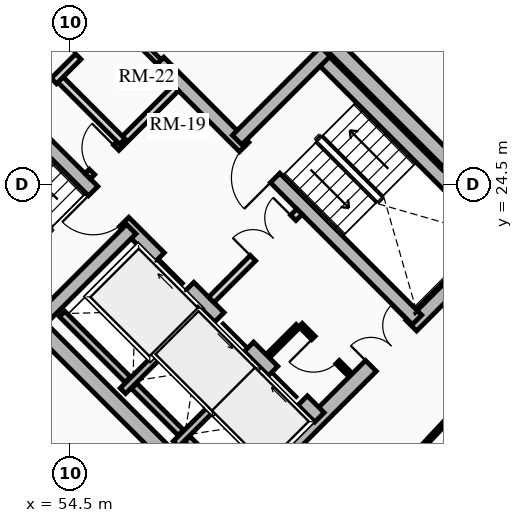
"""IFC4 building model, lengths in metres.
Left out: names, types, materials, properties, quantities, classifications, styles, units other than length and angle.
Written with IfcOpenShell. Run it as: python <this file> out.ifc"""

import sys

from ifc_helpers import new_model, si_unit, direction, frame, frame_2d, origin, place, context, subcontext, project, spatial, rectangle, extrude, source, transform, mapped, element, fill, save


model = new_model("IFC4")
c1 = context("Model", 3, precision=1e-05, world=origin(), true_north=direction((0.0, 1.0)))
c2 = subcontext(c1, "Body", "Model", "MODEL_VIEW")
j1 = project(units=[si_unit("LENGTHUNIT", "METRE"), si_unit("PLANEANGLEUNIT", "RADIAN")], contexts=[c1])
p1 = place(None, origin())
s1 = spatial("IfcSite", under=j1, at=p1, CompositionType="ELEMENT")
p2 = place(p1, origin())
s2 = spatial("IfcBuilding", under=s1, at=p2, CompositionType="ELEMENT")
p3 = place(p2, frame((0.0, 0.0, 232.45)))
s3 = spatial("IfcBuildingStorey", under=s2, at=p3, CompositionType="ELEMENT", Elevation=232.45)
for number, where, z_axis, x_axis in (
    (1, (58.702, 15.732, 0.0), (0.0, 0.0, 1.0), (-0.707, 0.707, 0.0)),
    (2, (66.268, 23.298, 0.0), (0.0, 0.0, 1.0), (-0.707, 0.707, 0.0)),
):
    element("IfcWall", number, at=place(p3, frame(where, z_axis=z_axis, x_axis=x_axis)), inside=s3, PredefinedType="SHEAR", context=c2, shape_type="SweptSolid", body=[
        extrude(rectangle(XDim=14.1, YDim=0.4, at=frame_2d((7.05, 0.0))), origin(), (0.0, 0.0, 1.0), 3.2),
    ])
p4 = place(p3, frame((58.561, 15.873, 0.0), z_axis=(0.0, 0.0, 1.0), x_axis=(0.707106781187, 0.707106781187, 0.0)))
e3 = element("IfcWall", 3, at=p4, inside=s3, PredefinedType="SHEAR", context=c2, shape_type="SweptSolid", body=[
    extrude(rectangle(XDim=10.7, YDim=0.4, at=frame_2d((5.35, 0.0))), origin(), (0.0, 0.0, 1.0), 3.2),
])
m1 = source(origin(), c2, "Body", "SweptSolid", [
    extrude(rectangle(XDim=1.5, YDim=2.02, at=frame_2d((0.75, 1.01))), frame((0.0, 0.21, 0.0), z_axis=(0.0, -1.0, 0.0), x_axis=(1.0, 0.0, 0.0)), (0.0, 0.0, 1.0), 0.42),
])
p5 = place(p4, frame((5.45, 0.0, 0.0)))
e4 = element("IfcOpeningElement", 4, at=p5, cuts=e3, PredefinedType="OPENING", context=c2, shape_type="MappedRepresentation", body=[
    mapped(m1, transform((0.0, 0.0, 0.0), x_axis=(1.0, 0.0, 0.0), y_axis=(0.0, 1.0, 0.0), z_axis=(0.0, 0.0, 1.0), scale=1.0)),
])
p6 = place(p3, frame((48.873, 25.561, 0.0), z_axis=(0.0, 0.0, 1.0), x_axis=(0.707106781187, 0.707106781187, 0.0)))
e5 = element("IfcWall", 5, at=p6, inside=s3, PredefinedType="SHEAR", context=c2, shape_type="SweptSolid", body=[
    extrude(rectangle(XDim=10.7, YDim=0.4, at=frame_2d((5.35, 0.0))), origin(), (0.0, 0.0, 1.0), 3.2),
])
p7 = place(p6, frame((4.6, 0.0, 0.0)))
e6 = element("IfcOpeningElement", 6, at=p7, cuts=e5, PredefinedType="OPENING", context=c2, shape_type="MappedRepresentation", body=[
    mapped(m1, transform((0.0, 0.0, 0.0), x_axis=(1.0, 0.0, 0.0), y_axis=(0.0, 1.0, 0.0), z_axis=(0.0, 0.0, 1.0), scale=1.0)),
])
p8 = place(p3, frame((61.06, 18.373, 0.0), z_axis=(0.0, 0.0, 1.0), x_axis=(-0.707106781187, 0.707106781187, 0.0)))
e7 = element("IfcWall", 7, at=p8, inside=s3, PredefinedType="SHEAR", context=c2, shape_type="SweptSolid", body=[
    extrude(rectangle(XDim=13.7, YDim=0.35, at=frame_2d((6.85, 0.0))), origin(), (0.0, 0.0, 1.0), 3.2),
])
m2 = source(origin(), c2, "Body", "SweptSolid", [
    extrude(rectangle(XDim=1.1, YDim=2.015, at=frame_2d((0.55, 1.007))), frame((0.0, 0.185, 0.0), z_axis=(0.0, -1.0, 0.0), x_axis=(1.0, 0.0, 0.0)), (0.0, 0.0, 1.0), 0.37),
])
p9 = place(p8, frame((4.85, 0.0, 0.0)))
e8 = element("IfcOpeningElement", 8, at=p9, cuts=e7, PredefinedType="OPENING", context=c2, shape_type="MappedRepresentation", body=[
    mapped(m2, transform((0.0, 0.0, 0.0), x_axis=(1.0, 0.0, 0.0), y_axis=(0.0, 1.0, 0.0), z_axis=(0.0, 0.0, 1.0), scale=1.0)),
])
p10 = place(p8, frame((0.625, 0.0, 0.0)))
e9 = element("IfcOpeningElement", 9, at=p10, cuts=e7, PredefinedType="OPENING", context=c2, shape_type="MappedRepresentation", body=[
    mapped(m2, transform((0.0, 0.0, 0.0), x_axis=(1.0, 0.0, 0.0), y_axis=(0.0, 1.0, 0.0), z_axis=(0.0, 0.0, 1.0), scale=1.0)),
])
p11 = place(p8, frame((2.625, 0.0, 0.0)))
e10 = element("IfcOpeningElement", 10, at=p11, cuts=e7, PredefinedType="OPENING", context=c2, shape_type="MappedRepresentation", body=[
    mapped(m2, transform((0.0, 0.0, 0.0), x_axis=(1.0, 0.0, 0.0), y_axis=(0.0, 1.0, 0.0), z_axis=(0.0, 0.0, 1.0), scale=1.0)),
])
m3 = source(origin(), c2, "Body", "SweptSolid", [
    extrude(rectangle(XDim=1.15, YDim=2.02, at=frame_2d((0.575, 1.01))), frame((0.0, 0.185, 0.0), z_axis=(0.0, -1.0, 0.0), x_axis=(1.0, 0.0, 0.0)), (0.0, 0.0, 1.0), 0.37),
])
p12 = place(p8, frame((7.27, 0.0, 0.0)))
e11 = element("IfcOpeningElement", 11, at=p12, cuts=e7, PredefinedType="OPENING", context=c2, shape_type="MappedRepresentation", body=[
    mapped(m3, transform((0.0, 0.0, 0.0), x_axis=(1.0, 0.0, 0.0), y_axis=(0.0, 1.0, 0.0), z_axis=(0.0, 0.0, 1.0), scale=1.0)),
])
p13 = place(p3, frame((63.627, 20.94, 0.0), z_axis=(0.0, 0.0, 1.0), x_axis=(-0.707119496762, 0.707094065383, 0.0)))
e12 = element("IfcWall", 12, at=p13, inside=s3, PredefinedType="SHEAR", context=c2, shape_type="SweptSolid", body=[
    extrude(rectangle(XDim=9.6, YDim=0.35, at=frame_2d((4.8, 0.0))), origin(), (0.0, 0.0, 1.0), 3.2),
])
p14 = place(p13, frame((5.28, 0.0, 0.0)))
e13 = element("IfcOpeningElement", 13, at=p14, cuts=e12, PredefinedType="OPENING", context=c2, shape_type="MappedRepresentation", body=[
    mapped(m3, transform((0.0, 0.0, 0.0), x_axis=(1.0, 0.0, 0.0), y_axis=(0.0, 1.0, 0.0), z_axis=(0.0, 0.0, 1.0), scale=1.0)),
])
p15 = place(p3, frame((53.922, 21.141, 0.0), z_axis=(0.0, 0.0, 1.0), x_axis=(-0.707106781187, 0.707106781187, 0.0)))
e14 = element("IfcWall", 14, at=p15, inside=s3, PredefinedType="SHEAR", context=c2, shape_type="SweptSolid", body=[
    extrude(rectangle(XDim=6.695, YDim=0.35, at=frame_2d((3.348, 0.0))), origin(), (0.0, 0.0, 1.0), 3.2),
])
p16 = place(p3, frame((53.784, 21.003, 0.0), z_axis=(0.0, 0.0, 1.0), x_axis=(0.707106781187, 0.707106781187, 0.0)))
e15 = element("IfcWall", 15, at=p16, inside=s3, PredefinedType="SHEAR", context=c2, shape_type="SweptSolid", body=[
    extrude(rectangle(XDim=3.285, YDim=0.35, at=frame_2d((1.643, 0.0))), origin(), (0.0, 0.0, 1.0), 3.2),
])
p17 = place(p3, frame((65.812, 23.125, 0.0), z_axis=(0.0, 0.0, 1.0), x_axis=(-0.707106781187, 0.707106781187, 0.0)))
e16 = element("IfcWall", 16, at=p17, inside=s3, PredefinedType="SHEAR", context=c2, shape_type="SweptSolid", body=[
    extrude(rectangle(XDim=6.695, YDim=0.35, at=frame_2d((3.348, 0.0))), origin(), (0.0, 0.0, 1.0), 3.2),
])
p18 = place(p3, frame((58.893, 25.674, 0.0), z_axis=(0.0, 0.0, 1.0), x_axis=(0.707106781187, 0.707106781187, 0.0)))
e17 = element("IfcWall", 17, at=p18, inside=s3, PredefinedType="SHEAR", context=c2, shape_type="SweptSolid", body=[
    extrude(rectangle(XDim=3.285, YDim=0.35, at=frame_2d((1.643, 0.0))), origin(), (0.0, 0.0, 1.0), 3.2),
])
p19 = place(p3, frame((55.888, 19.069, 0.0), z_axis=(0.0, 0.0, 1.0), x_axis=(0.707106781187, 0.707106781187, 0.0)))
e18 = element("IfcWall", 18, at=p19, inside=s3, PredefinedType="SHEAR", context=c2, shape_type="SweptSolid", body=[
    extrude(rectangle(XDim=2.97, YDim=0.2, at=frame_2d((1.485, 0.0))), origin(), (0.0, 0.0, 1.0), 3.2),
])
p20 = place(p3, frame((56.015, 19.366, 0.0), z_axis=(0.0, 0.0, 1.0), x_axis=(-0.707106781187, 0.707106781187, 0.0)))
e19 = element("IfcWall", 19, at=p20, inside=s3, PredefinedType="SHEAR", context=c2, shape_type="SweptSolid", body=[
    extrude(rectangle(XDim=2.44, YDim=0.2, at=frame_2d((1.22, 0.0))), origin(), (0.0, 0.0, 1.0), 3.2),
])
p21 = place(p3, frame((57.284, 17.673, 0.0), z_axis=(0.0, 0.0, 1.0), x_axis=(0.707147878904, 0.70706568108, 0.0)))
e20 = element("IfcWall", 20, at=p21, inside=s3, PredefinedType="SHEAR", context=c2, shape_type="SweptSolid", body=[
    extrude(rectangle(XDim=2.97, YDim=0.2, at=frame_2d((1.485, 0.0))), origin(), (0.0, 0.0, 1.0), 3.2),
])
p22 = place(p3, frame((57.412, 17.97, 0.0), z_axis=(0.0, 0.0, 1.0), x_axis=(-0.707106781187, 0.707106781187, 0.0)))
e21 = element("IfcWall", 21, at=p22, inside=s3, PredefinedType="SHEAR", context=c2, shape_type="SweptSolid", body=[
    extrude(rectangle(XDim=1.735, YDim=0.2, at=frame_2d((0.867, 0.0))), origin(), (0.0, 0.0, 1.0), 3.2),
])
p23 = place(p3, frame((58.737, 16.644, 0.0), z_axis=(0.0, 0.0, 1.0), x_axis=(-0.707032117043, 0.707181437447, 0.0)))
e22 = element("IfcWall", 22, at=p23, inside=s3, PredefinedType="SHEAR", context=c2, shape_type="SweptSolid", body=[
    extrude(rectangle(XDim=1.635, YDim=0.2, at=frame_2d((0.817, 0.0))), origin(), (0.0, 0.0, 1.0), 3.2),
])
p24 = place(p3, frame((58.214, 21.467, 0.0), z_axis=(0.0, 0.0, 1.0), x_axis=(0.707106781187, 0.707106781187, 0.0)))
e23 = element("IfcWall", 23, at=p24, inside=s3, PredefinedType="PARTITIONING", context=c2, shape_type="SweptSolid", body=[
    extrude(rectangle(XDim=3.28, YDim=0.2, at=frame_2d((1.64, 0.0))), origin(), (0.0, 0.0, 1.0), 2.765),
])
m4 = source(origin(), c2, "Body", "SweptSolid", [
    extrude(rectangle(XDim=1.5, YDim=2.02, at=frame_2d((0.75, 1.01))), frame((0.0, 0.11, 0.0), z_axis=(0.0, -1.0, 0.0), x_axis=(1.0, 0.0, 0.0)), (0.0, 0.0, 1.0), 0.22),
])
p25 = place(p24, frame((1.55, 0.0, 0.0)))
e24 = element("IfcOpeningElement", 24, at=p25, cuts=e23, PredefinedType="OPENING", context=c2, shape_type="MappedRepresentation", body=[
    mapped(m4, transform((0.0, 0.0, 0.0), x_axis=(1.0, 0.0, 0.0), y_axis=(0.0, 1.0, 0.0), z_axis=(0.0, 0.0, 1.0), scale=1.0)),
])
p26 = place(p3, frame((54.961, 24.719, 0.0), z_axis=(0.0, 0.0, 1.0), x_axis=(0.707106781187, 0.707106781187, 0.0)))
e25 = element("IfcWall", 25, at=p26, inside=s3, PredefinedType="PARTITIONING", context=c2, shape_type="SweptSolid", body=[
    extrude(rectangle(XDim=3.28, YDim=0.2, at=frame_2d((1.64, 0.0))), origin(), (0.0, 0.0, 1.0), 2.765),
])
m5 = source(origin(), c2, "Body", "SweptSolid", [
    extrude(rectangle(XDim=0.9, YDim=2.005, at=frame_2d((0.45, 1.002))), frame((0.0, 0.11, 0.0), z_axis=(0.0, -1.0, 0.0), x_axis=(1.0, 0.0, 0.0)), (0.0, 0.0, 1.0), 0.22),
])
p27 = place(p26, frame((0.16, 0.0, 0.0)))
e26 = element("IfcOpeningElement", 26, at=p27, cuts=e25, PredefinedType="OPENING", context=c2, shape_type="MappedRepresentation", body=[
    mapped(m5, transform((0.0, 0.0, 0.0), x_axis=(1.0, 0.0, 0.0), y_axis=(0.0, 1.0, 0.0), z_axis=(0.0, 0.0, 1.0), scale=1.0)),
])
p28 = place(p3, frame((55.874, 25.631, 0.0), z_axis=(0.0, 0.0, 1.0), x_axis=(-0.707157639372, 0.707055919343, 0.0)))
e27 = element("IfcWall", 27, at=p28, inside=s3, PredefinedType="PARTITIONING", context=c2, shape_type="SweptSolid", body=[
    extrude(rectangle(XDim=2.4, YDim=0.2, at=frame_2d((1.2, 0.0))), origin(), (0.0, 0.0, 1.0), 2.765),
])
p29 = place(p3, frame((53.264, 26.416, 0.0), z_axis=(0.0, 0.0, 1.0), x_axis=(0.707106781187, 0.707106781187, 0.0)))
e28 = element("IfcWall", 28, at=p29, inside=s3, PredefinedType="PARTITIONING", context=c2, shape_type="SweptSolid", body=[
    extrude(rectangle(XDim=3.28, YDim=0.2, at=frame_2d((1.64, 0.0))), origin(), (0.0, 0.0, 1.0), 2.765),
])
m6 = source(origin(), c2, "Body", "SweptSolid", [
    extrude(rectangle(XDim=1.0, YDim=2.015, at=frame_2d((0.5, 1.007))), frame((0.0, 0.11, 0.0), z_axis=(0.0, -1.0, 0.0), x_axis=(1.0, 0.0, 0.0)), (0.0, 0.0, 1.0), 0.22),
])
p30 = place(p29, frame((0.14, 0.0, 0.0)))
e29 = element("IfcOpeningElement", 29, at=p30, cuts=e28, PredefinedType="OPENING", context=c2, shape_type="MappedRepresentation", body=[
    mapped(m6, transform((0.0, 0.0, 0.0), x_axis=(1.0, 0.0, 0.0), y_axis=(0.0, 1.0, 0.0), z_axis=(0.0, 0.0, 1.0), scale=1.0)),
])
p31 = place(p29, frame((2.05, 0.0, 0.0)))
e30 = element("IfcOpeningElement", 30, at=p31, cuts=e28, PredefinedType="OPENING", context=c2, shape_type="MappedRepresentation", body=[
    mapped(m5, transform((0.0, 0.0, 0.0), x_axis=(1.0, 0.0, 0.0), y_axis=(0.0, 1.0, 0.0), z_axis=(0.0, 0.0, 1.0), scale=1.0)),
])
p32 = place(p3, frame((61.835, 19.529, 0.0), z_axis=(0.0, 0.0, 1.0), x_axis=(-0.707174592913, 0.707038962956, 0.0)))
e31 = element("IfcWall", 31, at=p32, inside=s3, PredefinedType="PARTITIONING", context=c2, shape_type="SweptSolid", body=[
    extrude(rectangle(XDim=1.8, YDim=0.125, at=frame_2d((0.9, 0.0))), origin(), (0.0, 0.0, 1.0), 2.765),
])
m7 = source(origin(), c2, "Body", "SweptSolid", [
    extrude(rectangle(XDim=0.9, YDim=2.005, at=frame_2d((0.45, 1.002))), frame((0.0, 0.073, 0.0), z_axis=(0.0, -1.0, 0.0), x_axis=(1.0, 0.0, 0.0)), (0.0, 0.0, 1.0), 0.145),
])
p33 = place(p32, frame((0.42, 0.0, 0.0)))
e32 = element("IfcOpeningElement", 32, at=p33, cuts=e31, PredefinedType="OPENING", context=c2, shape_type="MappedRepresentation", body=[
    mapped(m7, transform((0.0, 0.0, 0.0), x_axis=(1.0, 0.0, 0.0), y_axis=(0.0, 1.0, 0.0), z_axis=(0.0, 0.0, 1.0), scale=1.0)),
])
p34 = place(p3, frame((59.713, 19.996, 0.0), z_axis=(0.0, 0.0, 1.0), x_axis=(0.707217726, 0.706995818963, 0.0)))
e33 = element("IfcWall", 33, at=p34, inside=s3, PredefinedType="PARTITIONING", context=c2, shape_type="SweptSolid", body=[
    extrude(rectangle(XDim=1.1, YDim=0.125, at=frame_2d((0.55, 0.0))), origin(), (0.0, 0.0, 1.0), 2.765),
])
p35 = place(p3, frame((56.839, 27.728, 0.0), z_axis=(0.0, 0.0, 1.0), x_axis=(-0.707106781187, 0.707106781187, 0.0)))
e34 = element("IfcWall", 34, at=p35, inside=s3, PredefinedType="PARTITIONING", context=c2, shape_type="SweptSolid", body=[
    extrude(rectangle(XDim=3.9, YDim=0.16, at=frame_2d((1.95, 0.0))), origin(), (0.0, 0.0, 1.0), 2.765),
])
m8 = source(origin(), c2, "Body", "SweptSolid", [
    extrude(rectangle(XDim=0.9, YDim=2.005, at=frame_2d((0.45, 1.002))), frame((0.0, 0.09, 0.0), z_axis=(0.0, -1.0, 0.0), x_axis=(1.0, 0.0, 0.0)), (0.0, 0.0, 1.0), 0.18),
])
p36 = place(p35, frame((2.2, 0.0, 0.0)))
e35 = element("IfcOpeningElement", 35, at=p36, cuts=e34, PredefinedType="OPENING", context=c2, shape_type="MappedRepresentation", body=[
    mapped(m8, transform((0.0, 0.0, 0.0), x_axis=(1.0, 0.0, 0.0), y_axis=(0.0, 1.0, 0.0), z_axis=(0.0, 0.0, 1.0), scale=1.0)),
])
p37 = place(p3, frame((51.914, 18.914, 0.0), z_axis=(0.0, 0.0, 1.0), x_axis=(0.699999313799, -0.714143515465, 0.0)))
e36 = element("IfcWall", 36, at=p37, inside=s3, PredefinedType="MOVABLE", context=c2, shape_type="SweptSolid", body=[
    extrude(rectangle(XDim=6.162, YDim=0.1, at=frame_2d((3.081, 0.0))), origin(), (0.0, 0.0, 1.0), 2.335),
])
m9 = source(origin(), c2, "Body", "SweptSolid", [
    extrude(rectangle(XDim=1.05, YDim=2.015, at=frame_2d((0.525, 1.007))), frame((0.0, 0.06, 0.0), z_axis=(0.0, -1.0, 0.0), x_axis=(1.0, 0.0, 0.0)), (0.0, 0.0, 1.0), 0.12),
])
p38 = place(p37, frame((2.556, 0.0, 0.0)))
e37 = element("IfcOpeningElement", 37, at=p38, cuts=e36, PredefinedType="OPENING", context=c2, shape_type="MappedRepresentation", body=[
    mapped(m9, transform((0.0, 0.0, 0.0), x_axis=(1.0, 0.0, 0.0), y_axis=(0.0, 1.0, 0.0), z_axis=(0.0, 0.0, 1.0), scale=1.0)),
])
p39 = place(p3, frame((62.903, 16.667, 0.0), z_axis=(0.0, 0.0, 1.0), x_axis=(0.682371947497, 0.731005147225, 0.0)))
e38 = element("IfcWall", 38, at=p39, inside=s3, PredefinedType="MOVABLE", context=c2, shape_type="SweptSolid", body=[
    extrude(rectangle(XDim=6.642, YDim=0.1, at=frame_2d((3.321, 0.0))), origin(), (0.0, 0.0, 1.0), 2.335),
])
p40 = place(p39, frame((2.796, 0.0, 0.0)))
e39 = element("IfcOpeningElement", 39, at=p40, cuts=e38, PredefinedType="OPENING", context=c2, shape_type="MappedRepresentation", body=[
    mapped(m9, transform((0.0, 0.0, 0.0), x_axis=(1.0, 0.0, 0.0), y_axis=(0.0, 1.0, 0.0), z_axis=(0.0, 0.0, 1.0), scale=1.0)),
])
m10 = source(origin(), c2, "Body", "SweptSolid", [
    extrude(rectangle(XDim=1.1, YDim=2.015, at=frame_2d((0.55, 1.007))), frame((0.0, 0.025, 0.0), z_axis=(0.0, -1.0, 0.0), x_axis=(1.0, 0.0, 0.0)), (0.0, 0.0, 1.0), 0.05),
])
p41 = place(p9, origin())
e40 = element("IfcDoor", 40, at=p41, inside=s3, OperationType="SLIDING_TO_RIGHT", PredefinedType="DOOR", context=c2, shape_type="MappedRepresentation", body=[
    mapped(m10, transform((0.0, 0.0, 0.0), x_axis=(1.0, 0.0, 0.0), y_axis=(0.0, 1.0, 0.0), z_axis=(0.0, 0.0, 1.0), scale=1.0)),
])
fill(e8, e40)
p42 = place(p10, origin())
e41 = element("IfcDoor", 41, at=p42, inside=s3, OperationType="SLIDING_TO_RIGHT", PredefinedType="DOOR", context=c2, shape_type="MappedRepresentation", body=[
    mapped(m10, transform((0.0, 0.0, 0.0), x_axis=(1.0, 0.0, 0.0), y_axis=(0.0, 1.0, 0.0), z_axis=(0.0, 0.0, 1.0), scale=1.0)),
])
fill(e9, e41)
p43 = place(p11, origin())
e42 = element("IfcDoor", 42, at=p43, inside=s3, OperationType="SLIDING_TO_LEFT", PredefinedType="DOOR", context=c2, shape_type="MappedRepresentation", body=[
    mapped(m10, transform((0.0, 0.0, 0.0), x_axis=(1.0, 0.0, 0.0), y_axis=(0.0, 1.0, 0.0), z_axis=(0.0, 0.0, 1.0), scale=1.0)),
])
fill(e10, e42)
m11 = source(origin(), c2, "Body", "SweptSolid", [
    extrude(rectangle(XDim=1.15, YDim=2.02, at=frame_2d((0.575, 1.01))), frame((0.0, 0.025, 0.0), z_axis=(0.0, -1.0, 0.0), x_axis=(1.0, 0.0, 0.0)), (0.0, 0.0, 1.0), 0.05),
])
p44 = place(p12, origin())
e43 = element("IfcDoor", 43, at=p44, inside=s3, OperationType="SINGLE_SWING_RIGHT", PredefinedType="DOOR", context=c2, shape_type="MappedRepresentation", body=[
    mapped(m11, transform((0.0, 0.0, 0.0), x_axis=(1.0, 0.0, 0.0), y_axis=(0.0, 1.0, 0.0), z_axis=(0.0, 0.0, 1.0), scale=1.0)),
])
fill(e11, e43)
p45 = place(p14, origin())
e44 = element("IfcDoor", 44, at=p45, inside=s3, OperationType="SINGLE_SWING_LEFT", PredefinedType="DOOR", context=c2, shape_type="MappedRepresentation", body=[
    mapped(m11, transform((0.0, 0.0, 0.0), x_axis=(1.0, 0.0, 0.0), y_axis=(0.0, 1.0, 0.0), z_axis=(0.0, 0.0, 1.0), scale=1.0)),
])
fill(e13, e44)
m12 = source(origin(), c2, "Body", "SweptSolid", [
    extrude(rectangle(XDim=1.5, YDim=2.02, at=frame_2d((0.75, 1.01))), frame((0.0, 0.025, 0.0), z_axis=(0.0, -1.0, 0.0), x_axis=(1.0, 0.0, 0.0)), (0.0, 0.0, 1.0), 0.05),
])
p46 = place(p5, origin())
e45 = element("IfcDoor", 45, at=p46, inside=s3, OperationType="DOUBLE_DOOR_SINGLE_SWING", PredefinedType="DOOR", context=c2, shape_type="MappedRepresentation", body=[
    mapped(m12, transform((0.0, 0.0, 0.0), x_axis=(1.0, 0.0, 0.0), y_axis=(0.0, 1.0, 0.0), z_axis=(0.0, 0.0, 1.0), scale=1.0)),
])
fill(e4, e45)
p47 = place(p25, origin())
e46 = element("IfcDoor", 46, at=p47, inside=s3, OperationType="DOUBLE_DOOR_SINGLE_SWING", PredefinedType="DOOR", context=c2, shape_type="MappedRepresentation", body=[
    mapped(m12, transform((0.0, 0.0, 0.0), x_axis=(1.0, 0.0, 0.0), y_axis=(0.0, 1.0, 0.0), z_axis=(0.0, 0.0, 1.0), scale=1.0)),
])
fill(e24, e46)
m13 = source(origin(), c2, "Body", "SweptSolid", [
    extrude(rectangle(XDim=0.9, YDim=2.005, at=frame_2d((0.45, 1.002))), frame((0.0, 0.025, 0.0), z_axis=(0.0, -1.0, 0.0), x_axis=(1.0, 0.0, 0.0)), (0.0, 0.0, 1.0), 0.05),
])
p48 = place(p27, origin())
e47 = element("IfcDoor", 47, at=p48, inside=s3, OperationType="SINGLE_SWING_RIGHT", PredefinedType="DOOR", context=c2, shape_type="MappedRepresentation", body=[
    mapped(m13, transform((0.0, 0.0, 0.0), x_axis=(1.0, 0.0, 0.0), y_axis=(0.0, 1.0, 0.0), z_axis=(0.0, 0.0, 1.0), scale=1.0)),
])
fill(e26, e47)
m14 = source(origin(), c2, "Body", "SweptSolid", [
    extrude(rectangle(XDim=1.0, YDim=2.015, at=frame_2d((0.5, 1.007))), frame((0.0, 0.025, 0.0), z_axis=(0.0, -1.0, 0.0), x_axis=(1.0, 0.0, 0.0)), (0.0, 0.0, 1.0), 0.05),
])
p49 = place(p30, origin())
e48 = element("IfcDoor", 48, at=p49, inside=s3, OperationType="SINGLE_SWING_LEFT", PredefinedType="DOOR", context=c2, shape_type="MappedRepresentation", body=[
    mapped(m14, transform((0.0, 0.0, 0.0), x_axis=(1.0, 0.0, 0.0), y_axis=(0.0, 1.0, 0.0), z_axis=(0.0, 0.0, 1.0), scale=1.0)),
])
fill(e29, e48)
p50 = place(p33, origin())
e49 = element("IfcDoor", 49, at=p50, inside=s3, OperationType="SINGLE_SWING_RIGHT", PredefinedType="DOOR", context=c2, shape_type="MappedRepresentation", body=[
    mapped(m13, transform((0.0, 0.0, 0.0), x_axis=(1.0, 0.0, 0.0), y_axis=(0.0, 1.0, 0.0), z_axis=(0.0, 0.0, 1.0), scale=1.0)),
])
fill(e32, e49)
p51 = place(p31, origin())
e50 = element("IfcDoor", 50, at=p51, inside=s3, OperationType="SINGLE_SWING_LEFT", PredefinedType="DOOR", context=c2, shape_type="MappedRepresentation", body=[
    mapped(m13, transform((0.0, 0.0, 0.0), x_axis=(1.0, 0.0, 0.0), y_axis=(0.0, 1.0, 0.0), z_axis=(0.0, 0.0, 1.0), scale=1.0)),
])
fill(e30, e50)
save(model, sys.argv[1])
